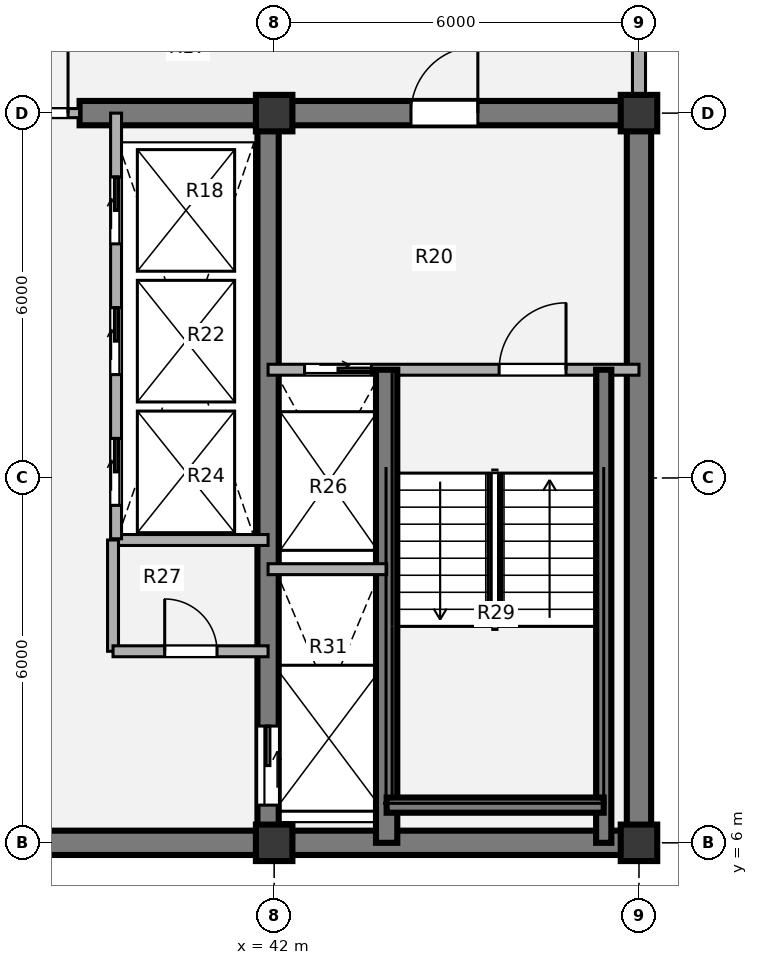
"""IFC4 building model, lengths in metres.
Left out: names, types, materials, properties, quantities, classifications, styles, units other than length and angle.
Written with IfcOpenShell. Run it as: python <this file> out.ifc"""

import sys

from ifc_helpers import new_model, si_unit, direction, frame, frame_2d, origin, origin_2d, place, context, subcontext, project, spatial, rectangle, extrude, source, transform, mapped, element, fill, save


model = new_model("IFC4")
c1 = context("Model", 3, precision=1e-05, world=origin(), true_north=direction((0.0, 1.0)))
c2 = subcontext(c1, "Body", "Model", "MODEL_VIEW")
j1 = project(units=[si_unit("LENGTHUNIT", "METRE"), si_unit("PLANEANGLEUNIT", "RADIAN")], contexts=[c1])
p1 = place(None, origin())
s1 = spatial("IfcSite", under=j1, at=p1, CompositionType="ELEMENT")
p2 = place(p1, origin())
s2 = spatial("IfcBuilding", under=s1, at=p2, CompositionType="ELEMENT")
p3 = place(p2, frame((0.0, 0.0, 245.7)))
s3 = spatial("IfcBuildingStorey", under=s2, at=p3, CompositionType="ELEMENT", Elevation=245.7)
m1 = source(origin(), c2, "Body", "SweptSolid", [
    extrude(rectangle(XDim=0.6, YDim=0.6, at=origin_2d()), origin(), (0.0, 0.0, 1.0), 3.78),
])
for number, where, z_axis, x_axis in (
    (1, (42.0, 6.0, 0.0), (0.0, 0.0, 1.0), (1.0, 0.0, 0.0)),
    (2, (48.0, 6.0, 0.0), (0.0, 0.0, 1.0), (1.0, 0.0, 0.0)),
    (3, (42.0, 18.0, 0.0), (0.0, 0.0, 1.0), (1.0, 0.0, 0.0)),
    (4, (48.0, 18.0, 0.0), (0.0, 0.0, 1.0), (1.0, 0.0, 0.0)),
):
    element("IfcColumn", number, at=place(p3, frame(where, z_axis=z_axis, x_axis=x_axis)), inside=s3, PredefinedType="COLUMN", context=c2, shape_type="MappedRepresentation", body=[
        mapped(m1, transform((0.0, 0.0, 0.0), x_axis=(1.0, 0.0, 0.0), y_axis=(0.0, 1.0, 0.0), z_axis=(0.0, 0.0, 1.0), scale=1.0)),
    ])
p4 = place(p3, frame((48.2, 6.0, 0.0), z_axis=(0.0, 0.0, 1.0), x_axis=(-1.0, 0.0, 0.0)))
e5 = element("IfcWall", 5, at=p4, inside=s3, PredefinedType="SHEAR", context=c2, shape_type="SweptSolid", body=[
    extrude(rectangle(XDim=24.4, YDim=0.4, at=frame_2d((12.2, 0.0))), origin(), (0.0, 0.0, 1.0), 3.78),
])
p5 = place(p3, frame((48.0, 18.0, 0.0), z_axis=(0.0, 0.0, 1.0), x_axis=(0.0, -1.0, 0.0)))
e6 = element("IfcWall", 6, at=p5, inside=s3, PredefinedType="SHEAR", context=c2, shape_type="SweptSolid", body=[
    extrude(rectangle(XDim=12.0, YDim=0.4, at=frame_2d((6.0, 0.0))), origin(), (0.0, 0.0, 1.0), 3.78),
])
p6 = place(p3, frame((38.8, 18.0, 0.0), z_axis=(0.0, 0.0, 1.0), x_axis=(1.0, 0.0, 0.0)))
e7 = element("IfcWall", 7, at=p6, inside=s3, PredefinedType="SHEAR", context=c2, shape_type="SweptSolid", body=[
    extrude(rectangle(XDim=9.4, YDim=0.4, at=frame_2d((4.7, 0.0))), origin(), (0.0, 0.0, 1.0), 3.78),
])
p7 = place(p6, frame((5.45, 0.0, 0.0)))
e8 = element("IfcOpeningElement", 8, at=p7, cuts=e7, PredefinedType="OPENING", context=c2, shape_type="SweptSolid", body=[
    extrude(rectangle(XDim=1.1, YDim=2.1, at=origin_2d()), frame((0.55, 0.21, 1.05), z_axis=(0.0, -1.0, 0.0), x_axis=(1.0, 0.0, 0.0)), (0.0, 0.0, 1.0), 0.42),
])
p8 = place(p3, frame((41.9, 18.0, 0.0), z_axis=(0.0, 0.0, 1.0), x_axis=(0.0, -1.0, 0.0)))
e9 = element("IfcWall", 9, at=p8, inside=s3, PredefinedType="SHEAR", context=c2, shape_type="SweptSolid", body=[
    extrude(rectangle(XDim=12.0, YDim=0.35, at=frame_2d((6.0, 0.0))), origin(), (0.0, 0.0, 1.0), 3.78),
])
p9 = place(p8, frame((10.08, 0.0, 0.0)))
e10 = element("IfcOpeningElement", 10, at=p9, cuts=e9, PredefinedType="OPENING", context=c2, shape_type="SweptSolid", body=[
    extrude(rectangle(XDim=1.3, YDim=2.1, at=origin_2d()), frame((0.65, 0.185, 1.05), z_axis=(0.0, -1.0, 0.0), x_axis=(1.0, 0.0, 0.0)), (0.0, 0.0, 1.0), 0.37),
])
p10 = place(p3, frame((48.0, 21.05, 0.0), z_axis=(0.0, 0.0, 1.0), x_axis=(0.0, -1.0, 0.0)))
e11 = element("IfcWall", 11, at=p10, inside=s3, PredefinedType="SOLIDWALL", context=c2, shape_type="SweptSolid", body=[
    extrude(rectangle(XDim=2.77, YDim=0.215, at=frame_2d((1.385, 0.0))), origin(), (0.0, 0.0, 1.0), 2.718),
])
p11 = place(p3, frame((39.35, 10.98, 0.0), z_axis=(0.0, 0.0, 1.0), x_axis=(1.0, 0.0, 0.0)))
e12 = element("IfcWall", 12, at=p11, inside=s3, PredefinedType="PARTITIONING", context=c2, shape_type="SweptSolid", body=[
    extrude(rectangle(XDim=2.55, YDim=0.18, at=frame_2d((1.275, 0.0))), origin(), (0.0, 0.0, 1.0), 3.5),
])
p12 = place(p3, frame((39.35, 9.15, 0.0), z_axis=(0.0, 0.0, 1.0), x_axis=(0.0, 1.0, 0.0)))
e13 = element("IfcWall", 13, at=p12, inside=s3, PredefinedType="PARTITIONING", context=c2, shape_type="SweptSolid", body=[
    extrude(rectangle(XDim=1.83, YDim=0.18, at=frame_2d((0.915, 0.0))), origin(), (0.0, 0.0, 1.0), 3.5),
])
p13 = place(p3, frame((39.35, 9.15, 0.0), z_axis=(0.0, 0.0, 1.0), x_axis=(1.0, 0.0, 0.0)))
e14 = element("IfcWall", 14, at=p13, inside=s3, PredefinedType="PARTITIONING", context=c2, shape_type="SweptSolid", body=[
    extrude(rectangle(XDim=2.55, YDim=0.18, at=frame_2d((1.275, 0.0))), origin(), (0.0, 0.0, 1.0), 3.5),
])
p14 = place(p13, frame((0.85, 0.0, 0.0)))
e15 = element("IfcOpeningElement", 15, at=p14, cuts=e14, PredefinedType="OPENING", context=c2, shape_type="SweptSolid", body=[
    extrude(rectangle(XDim=0.86, YDim=2.1, at=origin_2d()), frame((0.43, 0.1, 1.05), z_axis=(0.0, -1.0, 0.0), x_axis=(1.0, 0.0, 0.0)), (0.0, 0.0, 1.0), 0.2),
])
p15 = place(p3, frame((33.2, 18.0, 0.0), z_axis=(0.0, 0.0, 1.0), x_axis=(1.0, 0.0, 0.0)))
e16 = element("IfcWall", 16, at=p15, inside=s3, PredefinedType="PARTITIONING", context=c2, shape_type="SweptSolid", body=[
    extrude(rectangle(XDim=5.6, YDim=0.15, at=frame_2d((2.8, 0.0))), origin(), (0.0, 0.0, 1.0), 2.515),
])
p16 = place(p15, frame((0.19, 0.0, 0.0)))
e17 = element("IfcOpeningElement", 17, at=p16, cuts=e16, PredefinedType="OPENING", context=c2, shape_type="SweptSolid", body=[
    extrude(rectangle(XDim=1.1, YDim=2.1, at=origin_2d()), frame((0.55, 0.085, 1.05), z_axis=(0.0, -1.0, 0.0), x_axis=(1.0, 0.0, 0.0)), (0.0, 0.0, 1.0), 0.17),
])
p17 = place(p15, frame((4.31, 0.0, 0.0)))
e18 = element("IfcOpeningElement", 18, at=p17, cuts=e16, PredefinedType="OPENING", context=c2, shape_type="SweptSolid", body=[
    extrude(rectangle(XDim=1.1, YDim=2.1, at=origin_2d()), frame((0.55, 0.085, 1.05), z_axis=(0.0, -1.0, 0.0), x_axis=(1.0, 0.0, 0.0)), (0.0, 0.0, 1.0), 0.17),
])
p18 = place(p3, frame((41.9, 13.78, 0.0), z_axis=(0.0, 0.0, 1.0), x_axis=(1.0, 0.0, 0.0)))
e19 = element("IfcWall", 19, at=p18, inside=s3, PredefinedType="PARTITIONING", context=c2, shape_type="SweptSolid", body=[
    extrude(rectangle(XDim=6.1, YDim=0.18, at=frame_2d((3.05, 0.0))), origin(), (0.0, 0.0, 1.0), 3.5),
])
p19 = place(p18, frame((0.6, 0.0, 0.0)))
e20 = element("IfcOpeningElement", 20, at=p19, cuts=e19, PredefinedType="OPENING", context=c2, shape_type="SweptSolid", body=[
    extrude(rectangle(XDim=1.1, YDim=2.1, at=origin_2d()), frame((0.55, 0.1, 1.05), z_axis=(0.0, -1.0, 0.0), x_axis=(1.0, 0.0, 0.0)), (0.0, 0.0, 1.0), 0.2),
])
p20 = place(p18, frame((3.8, 0.0, 0.0)))
e21 = element("IfcOpeningElement", 21, at=p20, cuts=e19, PredefinedType="OPENING", context=c2, shape_type="SweptSolid", body=[
    extrude(rectangle(XDim=1.1, YDim=2.1, at=origin_2d()), frame((0.55, 0.1, 1.05), z_axis=(0.0, -1.0, 0.0), x_axis=(1.0, 0.0, 0.0)), (0.0, 0.0, 1.0), 0.2),
])
p21 = place(p3, frame((43.85, 6.0, 0.0), z_axis=(0.0, 0.0, 1.0), x_axis=(0.0, 1.0, 0.0)))
e22 = element("IfcWall", 22, at=p21, inside=s3, PredefinedType="SHEAR", context=c2, shape_type="SweptSolid", body=[
    extrude(rectangle(XDim=7.78, YDim=0.35, at=frame_2d((3.89, 0.0))), origin(), (0.0, 0.0, 1.0), 3.85),
])
p22 = place(p3, frame((47.42, 6.0, 0.0), z_axis=(0.0, 0.0, 1.0), x_axis=(0.0, 1.0, 0.0)))
e23 = element("IfcWall", 23, at=p22, inside=s3, PredefinedType="SHEAR", context=c2, shape_type="SweptSolid", body=[
    extrude(rectangle(XDim=7.78, YDim=0.25, at=frame_2d((3.89, 0.0))), origin(), (0.0, 0.0, 1.0), 3.85),
])
p23 = place(p3, frame((43.85, 6.62, 0.0), z_axis=(0.0, 0.0, 1.0), x_axis=(1.0, 0.0, 0.0)))
e24 = element("IfcWall", 24, at=p23, inside=s3, PredefinedType="SHEAR", context=c2, shape_type="SweptSolid", body=[
    extrude(rectangle(XDim=3.57, YDim=0.25, at=frame_2d((1.785, 0.0))), origin(), (0.0, 0.0, 1.0), 3.85),
])
p24 = place(p3, frame((41.9, 10.5, 0.0), z_axis=(0.0, 0.0, 1.0), x_axis=(1.0, 0.0, 0.0)))
e25 = element("IfcWall", 25, at=p24, inside=s3, PredefinedType="PARTITIONING", context=c2, shape_type="SweptSolid", body=[
    extrude(rectangle(XDim=1.95, YDim=0.18, at=frame_2d((0.975, 0.0))), origin(), (0.0, 0.0, 1.0), 3.5),
])
p25 = place(p3, frame((39.4, 11.0, 0.0), z_axis=(0.0, 0.0, 1.0), x_axis=(0.0, 1.0, 0.0)))
e26 = element("IfcWall", 26, at=p25, inside=s3, PredefinedType="PARTITIONING", context=c2, shape_type="SweptSolid", body=[
    extrude(rectangle(XDim=7.0, YDim=0.18, at=frame_2d((3.5, 0.0))), origin(), (0.0, 0.0, 1.0), 3.5),
])
p26 = place(p25, frame((0.55, 0.0, 0.0)))
e27 = element("IfcOpeningElement", 27, at=p26, cuts=e26, PredefinedType="OPENING", context=c2, shape_type="SweptSolid", body=[
    extrude(rectangle(XDim=1.1, YDim=2.1, at=origin_2d()), frame((0.55, 0.1, 1.05), z_axis=(0.0, -1.0, 0.0), x_axis=(1.0, 0.0, 0.0)), (0.0, 0.0, 1.0), 0.2),
])
p27 = place(p25, frame((2.7, 0.0, 0.0)))
e28 = element("IfcOpeningElement", 28, at=p27, cuts=e26, PredefinedType="OPENING", context=c2, shape_type="SweptSolid", body=[
    extrude(rectangle(XDim=1.1, YDim=2.1, at=origin_2d()), frame((0.55, 0.1, 1.05), z_axis=(0.0, -1.0, 0.0), x_axis=(1.0, 0.0, 0.0)), (0.0, 0.0, 1.0), 0.2),
])
p28 = place(p25, frame((4.85, 0.0, 0.0)))
e29 = element("IfcOpeningElement", 29, at=p28, cuts=e26, PredefinedType="OPENING", context=c2, shape_type="SweptSolid", body=[
    extrude(rectangle(XDim=1.1, YDim=2.1, at=origin_2d()), frame((0.55, 0.1, 1.05), z_axis=(0.0, -1.0, 0.0), x_axis=(1.0, 0.0, 0.0)), (0.0, 0.0, 1.0), 0.2),
])
m2 = source(origin(), c2, "Body", "SweptSolid", [
    extrude(rectangle(XDim=0.86, YDim=2.1, at=origin_2d()), frame((0.43, 0.025, 1.05), z_axis=(0.0, -1.0, 0.0), x_axis=(1.0, 0.0, 0.0)), (0.0, 0.0, 1.0), 0.05),
])
p29 = place(p14, origin())
e30 = element("IfcDoor", 30, at=p29, inside=s3, OperationType="SINGLE_SWING_LEFT", PredefinedType="DOOR", context=c2, shape_type="MappedRepresentation", body=[
    mapped(m2, transform((0.0, 0.0, 0.0), x_axis=(1.0, 0.0, 0.0), y_axis=(0.0, 1.0, 0.0), z_axis=(0.0, 0.0, 1.0), scale=1.0)),
])
fill(e15, e30)
m3 = source(origin(), c2, "Body", "SweptSolid", [
    extrude(rectangle(XDim=1.1, YDim=2.1, at=origin_2d()), frame((0.55, 0.025, 1.05), z_axis=(0.0, -1.0, 0.0), x_axis=(1.0, 0.0, 0.0)), (0.0, 0.0, 1.0), 0.05),
])
p30 = place(p17, origin())
e31 = element("IfcDoor", 31, at=p30, inside=s3, OperationType="SINGLE_SWING_RIGHT", PredefinedType="DOOR", context=c2, shape_type="MappedRepresentation", body=[
    mapped(m3, transform((0.0, 0.0, 0.0), x_axis=(1.0, 0.0, 0.0), y_axis=(0.0, 1.0, 0.0), z_axis=(0.0, 0.0, 1.0), scale=1.0)),
])
fill(e18, e31)
m4 = source(origin(), c2, "Body", "SweptSolid", [
    extrude(rectangle(XDim=1.1, YDim=2.1, at=origin_2d()), frame((0.55, 0.025, 1.05), z_axis=(0.0, -1.0, 0.0), x_axis=(1.0, 0.0, 0.0)), (0.0, 0.0, 1.0), 0.05),
])
p31 = place(p19, origin())
e32 = element("IfcDoor", 32, at=p31, inside=s3, OperationType="SLIDING_TO_RIGHT", PredefinedType="DOOR", context=c2, shape_type="MappedRepresentation", body=[
    mapped(m4, transform((0.0, 0.0, 0.0), x_axis=(1.0, 0.0, 0.0), y_axis=(0.0, 1.0, 0.0), z_axis=(0.0, 0.0, 1.0), scale=1.0)),
])
fill(e20, e32)
m5 = source(origin(), c2, "Body", "SweptSolid", [
    extrude(rectangle(XDim=1.1, YDim=2.1, at=origin_2d()), frame((0.55, 0.025, 1.05), z_axis=(0.0, -1.0, 0.0), x_axis=(1.0, 0.0, 0.0)), (0.0, 0.0, 1.0), 0.05),
])
p32 = place(p20, origin())
e33 = element("IfcDoor", 33, at=p32, inside=s3, OperationType="SINGLE_SWING_RIGHT", PredefinedType="DOOR", context=c2, shape_type="MappedRepresentation", body=[
    mapped(m5, transform((0.0, 0.0, 0.0), x_axis=(1.0, 0.0, 0.0), y_axis=(0.0, 1.0, 0.0), z_axis=(0.0, 0.0, 1.0), scale=1.0)),
])
fill(e21, e33)
m6 = source(origin(), c2, "Body", "SweptSolid", [
    extrude(rectangle(XDim=1.3, YDim=2.1, at=origin_2d()), frame((0.65, 0.025, 1.05), z_axis=(0.0, -1.0, 0.0), x_axis=(1.0, 0.0, 0.0)), (0.0, 0.0, 1.0), 0.05),
])
p33 = place(p9, origin())
e34 = element("IfcDoor", 34, at=p33, inside=s3, OperationType="SLIDING_TO_LEFT", PredefinedType="DOOR", context=c2, shape_type="MappedRepresentation", body=[
    mapped(m6, transform((0.0, 0.0, 0.0), x_axis=(1.0, 0.0, 0.0), y_axis=(0.0, 1.0, 0.0), z_axis=(0.0, 0.0, 1.0), scale=1.0)),
])
fill(e10, e34)
p34 = place(p7, origin())
e35 = element("IfcDoor", 35, at=p34, inside=s3, OperationType="SINGLE_SWING_RIGHT", PredefinedType="DOOR", context=c2, shape_type="MappedRepresentation", body=[
    mapped(m3, transform((0.0, 0.0, 0.0), x_axis=(1.0, 0.0, 0.0), y_axis=(0.0, 1.0, 0.0), z_axis=(0.0, 0.0, 1.0), scale=1.0)),
])
fill(e8, e35)
p35 = place(p26, origin())
e36 = element("IfcDoor", 36, at=p35, inside=s3, OperationType="SLIDING_TO_RIGHT", PredefinedType="DOOR", context=c2, shape_type="MappedRepresentation", body=[
    mapped(m4, transform((0.0, 0.0, 0.0), x_axis=(1.0, 0.0, 0.0), y_axis=(0.0, 1.0, 0.0), z_axis=(0.0, 0.0, 1.0), scale=1.0)),
])
fill(e27, e36)
p36 = place(p27, origin())
e37 = element("IfcDoor", 37, at=p36, inside=s3, OperationType="SLIDING_TO_RIGHT", PredefinedType="DOOR", context=c2, shape_type="MappedRepresentation", body=[
    mapped(m4, transform((0.0, 0.0, 0.0), x_axis=(1.0, 0.0, 0.0), y_axis=(0.0, 1.0, 0.0), z_axis=(0.0, 0.0, 1.0), scale=1.0)),
])
fill(e28, e37)
p37 = place(p28, origin())
e38 = element("IfcDoor", 38, at=p37, inside=s3, OperationType="SLIDING_TO_RIGHT", PredefinedType="DOOR", context=c2, shape_type="MappedRepresentation", body=[
    mapped(m4, transform((0.0, 0.0, 0.0), x_axis=(1.0, 0.0, 0.0), y_axis=(0.0, 1.0, 0.0), z_axis=(0.0, 0.0, 1.0), scale=1.0)),
])
fill(e29, e38)
save(model, sys.argv[1])
